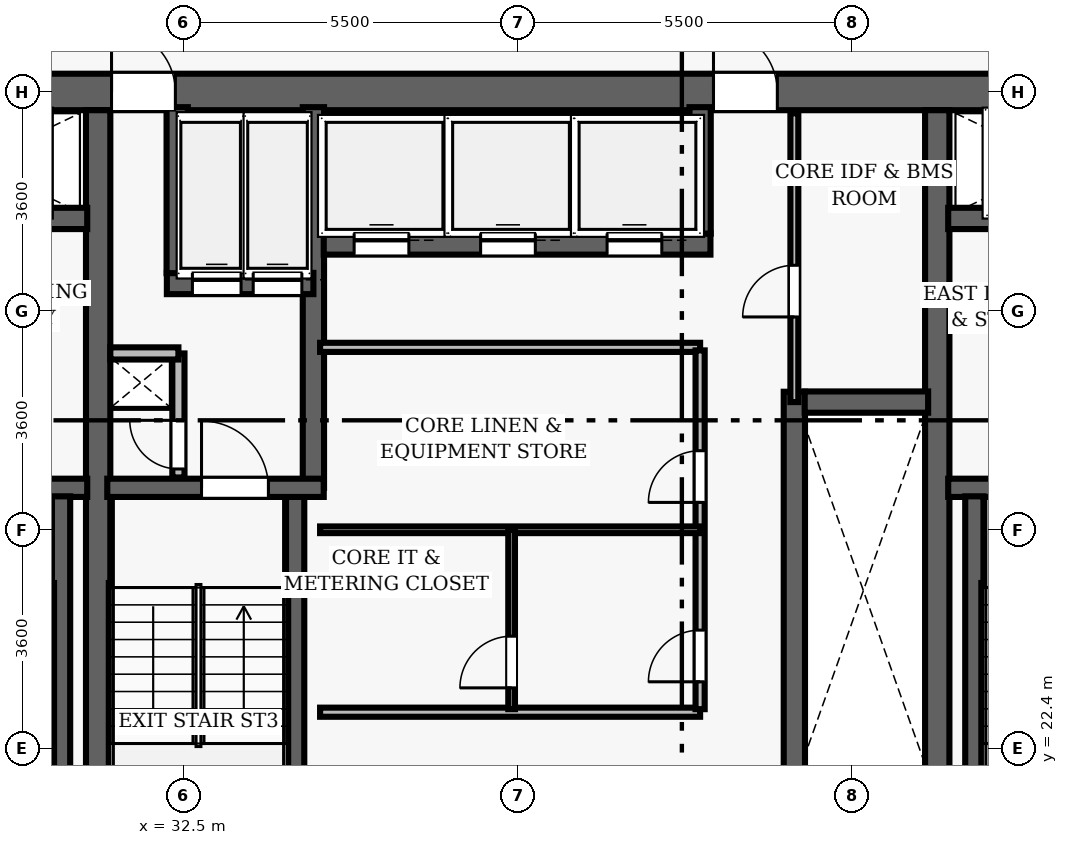
"""IFC4 building model, lengths in metres.
Left out: names, types, materials, properties, quantities, classifications, styles, units other than length and angle.
Written with IfcOpenShell. Run it as: python <this file> out.ifc"""

import sys

from ifc_helpers import new_model, si_unit, direction, frame, frame_2d, origin, place, context, subcontext, project, spatial, rectangle, extrude, element, fill, save


model = new_model("IFC4")
c1 = context("Model", 3, precision=1e-05, world=origin(), true_north=direction((0.0, 1.0)))
c2 = subcontext(c1, "Body", "Model", "MODEL_VIEW")
j1 = project(units=[si_unit("LENGTHUNIT", "METRE"), si_unit("PLANEANGLEUNIT", "RADIAN")], contexts=[c1])
p1 = place(None, origin())
s1 = spatial("IfcSite", under=j1, at=p1, CompositionType="ELEMENT")
p2 = place(p1, origin())
s2 = spatial("IfcBuilding", under=s1, at=p2, CompositionType="ELEMENT")
p3 = place(p2, frame((0.0, 0.0, 102.8)))
s3 = spatial("IfcBuildingStorey", under=s2, at=p3, CompositionType="ELEMENT", Elevation=102.8)
p4 = place(p3, frame((26.7, 33.2, 0.0), z_axis=(0.0, 0.0, 1.0), x_axis=(1.0, 0.0, 0.0)))
e1 = element("IfcWall", 1, at=p4, inside=s3, PredefinedType="SHEAR", context=c2, shape_type="SweptSolid", body=[
    extrude(rectangle(XDim=22.6, YDim=0.6, at=frame_2d((11.3, 0.0))), origin(), (0.0, 0.0, 1.0), 3.5),
])
p5 = place(p4, frame((4.62, 0.0, 0.0)))
e2 = element("IfcOpeningElement", 2, at=p5, cuts=e1, PredefinedType="OPENING", context=c2, shape_type="SweptSolid", body=[
    extrude(rectangle(XDim=1.05, YDim=2.15, at=frame_2d((0.525, 1.075))), frame((0.0, 0.31, 0.0), z_axis=(0.0, -1.0, 0.0), x_axis=(1.0, 0.0, 0.0)), (0.0, 0.0, 1.0), 0.62),
])
p6 = place(p4, frame((14.52, 0.0, 0.0)))
e3 = element("IfcOpeningElement", 3, at=p6, cuts=e1, PredefinedType="OPENING", context=c2, shape_type="SweptSolid", body=[
    extrude(rectangle(XDim=1.05, YDim=2.15, at=frame_2d((0.525, 1.075))), frame((0.0, 0.31, 0.0), z_axis=(0.0, -1.0, 0.0), x_axis=(1.0, 0.0, 0.0)), (0.0, 0.0, 1.0), 0.62),
])
for number, where, z_axis, x_axis in (
    (4, (31.1, 19.1, 0.0), (0.0, 0.0, 1.0), (0.0, 1.0, 0.0)),
    (5, (44.9, 19.1, 0.0), (0.0, 0.0, 1.0), (0.0, 1.0, 0.0)),
):
    element("IfcWall", number, at=place(p3, frame(where, z_axis=z_axis, x_axis=x_axis)), inside=s3, PredefinedType="SHEAR", context=c2, shape_type="SweptSolid", body=[
        extrude(rectangle(XDim=13.8, YDim=0.4, at=frame_2d((6.9, 0.0))), origin(), (0.0, 0.0, 1.0), 3.5),
    ])
p7 = place(p3, frame((27.25, 26.69, 0.0), z_axis=(0.0, 0.0, 1.0), x_axis=(1.0, 0.0, 0.0)))
e6 = element("IfcWall", 6, at=p7, inside=s3, PredefinedType="SHEAR", context=c2, shape_type="SweptSolid", body=[
    extrude(rectangle(XDim=3.67, YDim=0.3, at=frame_2d((1.835, 0.0))), origin(), (0.0, 0.0, 1.0), 3.5),
])
p8 = place(p7, frame((1.05, 0.0, 0.0)))
e7 = element("IfcOpeningElement", 7, at=p8, cuts=e6, PredefinedType="OPENING", context=c2, shape_type="SweptSolid", body=[
    extrude(rectangle(XDim=1.1, YDim=2.15, at=frame_2d((0.55, 1.075))), frame((0.0, 0.16, 0.0), z_axis=(0.0, -1.0, 0.0), x_axis=(1.0, 0.0, 0.0)), (0.0, 0.0, 1.0), 0.32),
])
p9 = place(p3, frame((30.49, 19.05, 0.0), z_axis=(0.0, 0.0, 1.0), x_axis=(0.0, 1.0, 0.0)))
e8 = element("IfcWall", 8, at=p9, inside=s3, PredefinedType="SHEAR", context=c2, shape_type="SweptSolid", body=[
    extrude(rectangle(XDim=7.5, YDim=0.3, at=frame_2d((3.75, 0.0))), origin(), (0.0, 0.0, 1.0), 3.5),
])
p10 = place(p3, frame((27.25, 31.12, 0.0), z_axis=(0.0, 0.0, 1.0), x_axis=(1.0, 0.0, 0.0)))
e9 = element("IfcWall", 9, at=p10, inside=s3, PredefinedType="SHEAR", context=c2, shape_type="SweptSolid", body=[
    extrude(rectangle(XDim=3.67, YDim=0.35, at=frame_2d((1.835, 0.0))), origin(), (0.0, 0.0, 1.0), 2.675),
])
p11 = place(p10, frame((1.25, 0.0, 0.0)))
e10 = element("IfcOpeningElement", 10, at=p11, cuts=e9, PredefinedType="OPENING", context=c2, shape_type="SweptSolid", body=[
    extrude(rectangle(XDim=1.1, YDim=2.15, at=frame_2d((0.55, 1.075))), frame((0.0, 0.185, 0.0), z_axis=(0.0, -1.0, 0.0), x_axis=(1.0, 0.0, 0.0)), (0.0, 0.0, 1.0), 0.37),
])
p12 = place(p3, frame((45.08, 26.69, 0.0), z_axis=(0.0, 0.0, 1.0), x_axis=(1.0, 0.0, 0.0)))
e11 = element("IfcWall", 11, at=p12, inside=s3, PredefinedType="SHEAR", context=c2, shape_type="SweptSolid", body=[
    extrude(rectangle(XDim=3.67, YDim=0.3, at=frame_2d((1.835, 0.0))), origin(), (0.0, 0.0, 1.0), 3.5),
])
p13 = place(p12, frame((1.05, 0.0, 0.0)))
e12 = element("IfcOpeningElement", 12, at=p13, cuts=e11, PredefinedType="OPENING", context=c2, shape_type="SweptSolid", body=[
    extrude(rectangle(XDim=1.1, YDim=2.15, at=frame_2d((0.55, 1.075))), frame((0.0, 0.16, 0.0), z_axis=(0.0, -1.0, 0.0), x_axis=(1.0, 0.0, 0.0)), (0.0, 0.0, 1.0), 0.32),
])
p14 = place(p3, frame((45.51, 19.05, 0.0), z_axis=(0.0, 0.0, 1.0), x_axis=(0.0, 1.0, 0.0)))
e13 = element("IfcWall", 13, at=p14, inside=s3, PredefinedType="SHEAR", context=c2, shape_type="SweptSolid", body=[
    extrude(rectangle(XDim=7.5, YDim=0.3, at=frame_2d((3.75, 0.0))), origin(), (0.0, 0.0, 1.0), 3.5),
])
p15 = place(p3, frame((45.08, 31.12, 0.0), z_axis=(0.0, 0.0, 1.0), x_axis=(1.0, 0.0, 0.0)))
e14 = element("IfcWall", 14, at=p15, inside=s3, PredefinedType="SHEAR", context=c2, shape_type="SweptSolid", body=[
    extrude(rectangle(XDim=3.67, YDim=0.35, at=frame_2d((1.835, 0.0))), origin(), (0.0, 0.0, 1.0), 2.675),
])
p16 = place(p15, frame((1.25, 0.0, 0.0)))
e15 = element("IfcOpeningElement", 15, at=p16, cuts=e14, PredefinedType="OPENING", context=c2, shape_type="SweptSolid", body=[
    extrude(rectangle(XDim=1.1, YDim=2.15, at=frame_2d((0.55, 1.075))), frame((0.0, 0.185, 0.0), z_axis=(0.0, -1.0, 0.0), x_axis=(1.0, 0.0, 0.0)), (0.0, 0.0, 1.0), 0.37),
])
p17 = place(p3, frame((34.34, 19.05, 0.0), z_axis=(0.0, 0.0, 1.0), x_axis=(0.0, 1.0, 0.0)))
e16 = element("IfcWall", 16, at=p17, inside=s3, PredefinedType="SHEAR", context=c2, shape_type="SweptSolid", body=[
    extrude(rectangle(XDim=7.5, YDim=0.3, at=frame_2d((3.75, 0.0))), origin(), (0.0, 0.0, 1.0), 3.5),
])
p18 = place(p3, frame((34.64, 26.69, 0.0), z_axis=(0.0, 0.0, 1.0), x_axis=(0.0, 1.0, 0.0)))
e17 = element("IfcWall", 17, at=p18, inside=s3, PredefinedType="SHEAR", context=c2, shape_type="SweptSolid", body=[
    extrude(rectangle(XDim=6.26, YDim=0.35, at=frame_2d((3.13, 0.0))), origin(), (0.0, 0.0, 1.0), 3.5),
])
p19 = place(p3, frame((31.25, 26.69, 0.0), z_axis=(0.0, 0.0, 1.0), x_axis=(1.0, 0.0, 0.0)))
e18 = element("IfcWall", 18, at=p19, inside=s3, PredefinedType="SHEAR", context=c2, shape_type="SweptSolid", body=[
    extrude(rectangle(XDim=3.56, YDim=0.3, at=frame_2d((1.78, 0.0))), origin(), (0.0, 0.0, 1.0), 3.5),
])
p20 = place(p19, frame((1.55, 0.0, 0.0)))
e19 = element("IfcOpeningElement", 19, at=p20, cuts=e18, PredefinedType="OPENING", context=c2, shape_type="SweptSolid", body=[
    extrude(rectangle(XDim=1.1, YDim=2.15, at=frame_2d((0.55, 1.075))), frame((0.0, 0.16, 0.0), z_axis=(0.0, -1.0, 0.0), x_axis=(1.0, 0.0, 0.0)), (0.0, 0.0, 1.0), 0.32),
])
p21 = place(p3, frame((32.23, 30.05, 0.0), z_axis=(0.0, 0.0, 1.0), x_axis=(1.0, 0.0, 0.0)))
e20 = element("IfcWall", 20, at=p21, inside=s3, PredefinedType="SHEAR", context=c2, shape_type="SweptSolid", body=[
    extrude(rectangle(XDim=2.41, YDim=0.35, at=frame_2d((1.205, 0.0))), origin(), (0.0, 0.0, 1.0), 2.675),
])
p22 = place(p21, frame((0.42, 0.0, 0.0)))
e21 = element("IfcOpeningElement", 21, at=p22, cuts=e20, PredefinedType="OPENING", context=c2, shape_type="SweptSolid", body=[
    extrude(rectangle(XDim=0.8, YDim=2.15, at=frame_2d((0.4, 1.075))), frame((0.0, 0.185, 0.0), z_axis=(0.0, -1.0, 0.0), x_axis=(1.0, 0.0, 0.0)), (0.0, 0.0, 1.0), 0.37),
])
p23 = place(p21, frame((1.42, 0.0, 0.0)))
e22 = element("IfcOpeningElement", 22, at=p23, cuts=e20, PredefinedType="OPENING", context=c2, shape_type="SweptSolid", body=[
    extrude(rectangle(XDim=0.8, YDim=2.15, at=frame_2d((0.4, 1.075))), frame((0.0, 0.185, 0.0), z_axis=(0.0, -1.0, 0.0), x_axis=(1.0, 0.0, 0.0)), (0.0, 0.0, 1.0), 0.37),
])
p24 = place(p3, frame((32.4, 30.22, 0.0), z_axis=(0.0, 0.0, 1.0), x_axis=(0.0, 1.0, 0.0)))
e23 = element("IfcWall", 23, at=p24, inside=s3, PredefinedType="SHEAR", context=c2, shape_type="SweptSolid", body=[
    extrude(rectangle(XDim=2.73, YDim=0.35, at=frame_2d((1.365, 0.0))), origin(), (0.0, 0.0, 1.0), 2.675),
])
p25 = place(p3, frame((32.42, 26.86, 0.0), z_axis=(0.0, 0.0, 1.0), x_axis=(0.0, 1.0, 0.0)))
e24 = element("IfcWall", 24, at=p25, inside=s3, PredefinedType="PARTITIONING", context=c2, shape_type="SweptSolid", body=[
    extrude(rectangle(XDim=2.04, YDim=0.2, at=frame_2d((1.02, 0.0))), origin(), (0.0, 0.0, 1.0), 2.675),
])
p26 = place(p25, frame((0.14, 0.0, 0.0)))
e25 = element("IfcOpeningElement", 25, at=p26, cuts=e24, PredefinedType="OPENING", context=c2, shape_type="SweptSolid", body=[
    extrude(rectangle(XDim=0.8, YDim=2.05, at=frame_2d((0.4, 1.025))), frame((0.0, 0.11, 0.0), z_axis=(0.0, -1.0, 0.0), x_axis=(1.0, 0.0, 0.0)), (0.0, 0.0, 1.0), 0.22),
])
p27 = place(p3, frame((31.3, 28.9, 0.0), z_axis=(0.0, 0.0, 1.0), x_axis=(1.0, 0.0, 0.0)))
e26 = element("IfcWall", 26, at=p27, inside=s3, PredefinedType="PARTITIONING", context=c2, shape_type="SweptSolid", body=[
    extrude(rectangle(XDim=1.12, YDim=0.2, at=frame_2d((0.56, 0.0))), origin(), (0.0, 0.0, 1.0), 2.675),
])
p28 = place(p3, frame((42.55, 21.73, 0.0), z_axis=(0.0, 0.0, 1.0), x_axis=(0.0, 1.0, 0.0)))
e27 = element("IfcWall", 27, at=p28, inside=s3, PredefinedType="SHEAR", context=c2, shape_type="SweptSolid", body=[
    extrude(rectangle(XDim=6.54, YDim=0.35, at=frame_2d((3.27, 0.0))), origin(), (0.0, 0.0, 1.0), 2.675),
])
p29 = place(p3, frame((42.72, 28.1, 0.0), z_axis=(0.0, 0.0, 1.0), x_axis=(1.0, 0.0, 0.0)))
e28 = element("IfcWall", 28, at=p29, inside=s3, PredefinedType="SHEAR", context=c2, shape_type="SweptSolid", body=[
    extrude(rectangle(XDim=2.03, YDim=0.35, at=frame_2d((1.015, 0.0))), origin(), (0.0, 0.0, 1.0), 2.675),
])
p30 = place(p3, frame((34.81, 30.7, 0.0), z_axis=(0.0, 0.0, 1.0), x_axis=(1.0, 0.0, 0.0)))
e29 = element("IfcWall", 29, at=p30, inside=s3, PredefinedType="SHEAR", context=c2, shape_type="SweptSolid", body=[
    extrude(rectangle(XDim=6.36, YDim=0.35, at=frame_2d((3.18, 0.0))), origin(), (0.0, 0.0, 1.0), 2.675),
])
p31 = place(p30, frame((0.5, 0.0, 0.0)))
e30 = element("IfcOpeningElement", 30, at=p31, cuts=e29, PredefinedType="OPENING", context=c2, shape_type="SweptSolid", body=[
    extrude(rectangle(XDim=0.9, YDim=2.15, at=frame_2d((0.45, 1.075))), frame((0.0, 0.185, 0.0), z_axis=(0.0, -1.0, 0.0), x_axis=(1.0, 0.0, 0.0)), (0.0, 0.0, 1.0), 0.37),
])
p32 = place(p30, frame((2.58, 0.0, 0.0)))
e31 = element("IfcOpeningElement", 31, at=p32, cuts=e29, PredefinedType="OPENING", context=c2, shape_type="SweptSolid", body=[
    extrude(rectangle(XDim=0.9, YDim=2.15, at=frame_2d((0.45, 1.075))), frame((0.0, 0.185, 0.0), z_axis=(0.0, -1.0, 0.0), x_axis=(1.0, 0.0, 0.0)), (0.0, 0.0, 1.0), 0.37),
])
p33 = place(p30, frame((4.66, 0.0, 0.0)))
e32 = element("IfcOpeningElement", 32, at=p33, cuts=e29, PredefinedType="OPENING", context=c2, shape_type="SweptSolid", body=[
    extrude(rectangle(XDim=0.9, YDim=2.15, at=frame_2d((0.45, 1.075))), frame((0.0, 0.185, 0.0), z_axis=(0.0, -1.0, 0.0), x_axis=(1.0, 0.0, 0.0)), (0.0, 0.0, 1.0), 0.37),
])
p34 = place(p3, frame((41.0, 30.87, 0.0), z_axis=(0.0, 0.0, 1.0), x_axis=(0.0, 1.0, 0.0)))
e33 = element("IfcWall", 33, at=p34, inside=s3, PredefinedType="SHEAR", context=c2, shape_type="SweptSolid", body=[
    extrude(rectangle(XDim=2.08, YDim=0.35, at=frame_2d((1.04, 0.0))), origin(), (0.0, 0.0, 1.0), 2.675),
])
for number, where, z_axis, x_axis in (
    (34, (34.75, 29.0, 0.0), (0.0, 0.0, 1.0), (1.0, 0.0, 0.0)),
    (35, (34.75, 23.0, 0.0), (0.0, 0.0, 1.0), (1.0, 0.0, 0.0)),
):
    element("IfcWall", number, at=place(p3, frame(where, z_axis=z_axis, x_axis=x_axis)), inside=s3, PredefinedType="PARTITIONING", context=c2, shape_type="SweptSolid", body=[
        extrude(rectangle(XDim=6.25, YDim=0.15, at=frame_2d((3.125, 0.0))), origin(), (0.0, 0.0, 1.0), 2.675),
    ])
p35 = place(p3, frame((41.0, 23.05, 0.0), z_axis=(0.0, 0.0, 1.0), x_axis=(0.0, 1.0, 0.0)))
e36 = element("IfcWall", 36, at=p35, inside=s3, PredefinedType="PARTITIONING", context=c2, shape_type="SweptSolid", body=[
    extrude(rectangle(XDim=5.9, YDim=0.15, at=frame_2d((2.95, 0.0))), origin(), (0.0, 0.0, 1.0), 2.675),
])
p36 = place(p35, frame((3.4, 0.0, 0.0)))
e37 = element("IfcOpeningElement", 37, at=p36, cuts=e36, PredefinedType="OPENING", context=c2, shape_type="SweptSolid", body=[
    extrude(rectangle(XDim=0.85, YDim=2.1, at=frame_2d((0.425, 1.05))), frame((0.0, 0.085, 0.0), z_axis=(0.0, -1.0, 0.0), x_axis=(1.0, 0.0, 0.0)), (0.0, 0.0, 1.0), 0.17),
])
p37 = place(p35, frame((0.45, 0.0, 0.0)))
e38 = element("IfcOpeningElement", 38, at=p37, cuts=e36, PredefinedType="OPENING", context=c2, shape_type="SweptSolid", body=[
    extrude(rectangle(XDim=0.85, YDim=2.1, at=frame_2d((0.425, 1.05))), frame((0.0, 0.085, 0.0), z_axis=(0.0, -1.0, 0.0), x_axis=(1.0, 0.0, 0.0)), (0.0, 0.0, 1.0), 0.17),
])
p38 = place(p3, frame((34.75, 26.0, 0.0), z_axis=(0.0, 0.0, 1.0), x_axis=(1.0, 0.0, 0.0)))
e39 = element("IfcWall", 39, at=p38, inside=s3, PredefinedType="PARTITIONING", context=c2, shape_type="SweptSolid", body=[
    extrude(rectangle(XDim=6.25, YDim=0.11, at=frame_2d((3.125, 0.0))), origin(), (0.0, 0.0, 1.0), 2.675),
])
p39 = place(p3, frame((37.9, 23.05, 0.0), z_axis=(0.0, 0.0, 1.0), x_axis=(0.0, 1.0, 0.0)))
e40 = element("IfcWall", 40, at=p39, inside=s3, PredefinedType="PARTITIONING", context=c2, shape_type="SweptSolid", body=[
    extrude(rectangle(XDim=2.95, YDim=0.11, at=frame_2d((1.475, 0.0))), origin(), (0.0, 0.0, 1.0), 2.675),
])
p40 = place(p39, frame((0.35, 0.0, 0.0)))
e41 = element("IfcOpeningElement", 41, at=p40, cuts=e40, PredefinedType="OPENING", context=c2, shape_type="SweptSolid", body=[
    extrude(rectangle(XDim=0.85, YDim=2.1, at=frame_2d((0.425, 1.05))), frame((0.0, 0.065, 0.0), z_axis=(0.0, -1.0, 0.0), x_axis=(1.0, 0.0, 0.0)), (0.0, 0.0, 1.0), 0.13),
])
p41 = place(p3, frame((42.55, 28.1, 0.0), z_axis=(0.0, 0.0, 1.0), x_axis=(0.0, 1.0, 0.0)))
e42 = element("IfcWall", 42, at=p41, inside=s3, PredefinedType="PARTITIONING", context=c2, shape_type="SweptSolid", body=[
    extrude(rectangle(XDim=4.75, YDim=0.13, at=frame_2d((2.375, 0.0))), origin(), (0.0, 0.0, 1.0), 2.675),
])
p42 = place(p41, frame((1.4, 0.0, 0.0)))
e43 = element("IfcOpeningElement", 43, at=p42, cuts=e42, PredefinedType="OPENING", context=c2, shape_type="SweptSolid", body=[
    extrude(rectangle(XDim=0.85, YDim=2.1, at=frame_2d((0.425, 1.05))), frame((0.0, 0.075, 0.0), z_axis=(0.0, -1.0, 0.0), x_axis=(1.0, 0.0, 0.0)), (0.0, 0.0, 1.0), 0.15),
])
p43 = place(p20, origin())
e44 = element("IfcDoor", 44, at=p43, inside=s3, OperationType="SINGLE_SWING_LEFT", PredefinedType="DOOR", context=c2, shape_type="SweptSolid", body=[
    extrude(rectangle(XDim=1.1, YDim=2.15, at=frame_2d((0.55, 1.075))), frame((0.0, 0.025, 0.0), z_axis=(0.0, -1.0, 0.0), x_axis=(1.0, 0.0, 0.0)), (0.0, 0.0, 1.0), 0.05),
])
fill(e19, e44)
p44 = place(p26, origin())
e45 = element("IfcDoor", 45, at=p44, inside=s3, OperationType="SINGLE_SWING_RIGHT", PredefinedType="DOOR", context=c2, shape_type="SweptSolid", body=[
    extrude(rectangle(XDim=0.8, YDim=2.05, at=frame_2d((0.4, 1.025))), frame((0.0, 0.025, 0.0), z_axis=(0.0, -1.0, 0.0), x_axis=(1.0, 0.0, 0.0)), (0.0, 0.0, 1.0), 0.05),
])
fill(e25, e45)
p45 = place(p5, origin())
e46 = element("IfcDoor", 46, at=p45, inside=s3, OperationType="SINGLE_SWING_LEFT", PredefinedType="DOOR", context=c2, shape_type="SweptSolid", body=[
    extrude(rectangle(XDim=1.05, YDim=2.15, at=frame_2d((0.525, 1.075))), frame((0.0, 0.025, 0.0), z_axis=(0.0, -1.0, 0.0), x_axis=(1.0, 0.0, 0.0)), (0.0, 0.0, 1.0), 0.05),
])
fill(e2, e46)
p46 = place(p6, origin())
e47 = element("IfcDoor", 47, at=p46, inside=s3, OperationType="SINGLE_SWING_LEFT", PredefinedType="DOOR", context=c2, shape_type="SweptSolid", body=[
    extrude(rectangle(XDim=1.05, YDim=2.15, at=frame_2d((0.525, 1.075))), frame((0.0, 0.025, 0.0), z_axis=(0.0, -1.0, 0.0), x_axis=(1.0, 0.0, 0.0)), (0.0, 0.0, 1.0), 0.05),
])
fill(e3, e47)
p47 = place(p36, origin())
e48 = element("IfcDoor", 48, at=p47, inside=s3, OperationType="SINGLE_SWING_LEFT", PredefinedType="DOOR", context=c2, shape_type="SweptSolid", body=[
    extrude(rectangle(XDim=0.85, YDim=2.1, at=frame_2d((0.425, 1.05))), frame((0.0, 0.025, 0.0), z_axis=(0.0, -1.0, 0.0), x_axis=(1.0, 0.0, 0.0)), (0.0, 0.0, 1.0), 0.05),
])
fill(e37, e48)
p48 = place(p37, origin())
e49 = element("IfcDoor", 49, at=p48, inside=s3, OperationType="SINGLE_SWING_LEFT", PredefinedType="DOOR", context=c2, shape_type="SweptSolid", body=[
    extrude(rectangle(XDim=0.85, YDim=2.1, at=frame_2d((0.425, 1.05))), frame((0.0, 0.025, 0.0), z_axis=(0.0, -1.0, 0.0), x_axis=(1.0, 0.0, 0.0)), (0.0, 0.0, 1.0), 0.05),
])
fill(e38, e49)
p49 = place(p40, origin())
e50 = element("IfcDoor", 50, at=p49, inside=s3, OperationType="SINGLE_SWING_LEFT", PredefinedType="DOOR", context=c2, shape_type="SweptSolid", body=[
    extrude(rectangle(XDim=0.85, YDim=2.1, at=frame_2d((0.425, 1.05))), frame((0.0, 0.025, 0.0), z_axis=(0.0, -1.0, 0.0), x_axis=(1.0, 0.0, 0.0)), (0.0, 0.0, 1.0), 0.05),
])
fill(e41, e50)
p50 = place(p42, origin())
e51 = element("IfcDoor", 51, at=p50, inside=s3, OperationType="SINGLE_SWING_LEFT", PredefinedType="DOOR", context=c2, shape_type="SweptSolid", body=[
    extrude(rectangle(XDim=0.85, YDim=2.1, at=frame_2d((0.425, 1.05))), frame((0.0, 0.025, 0.0), z_axis=(0.0, -1.0, 0.0), x_axis=(1.0, 0.0, 0.0)), (0.0, 0.0, 1.0), 0.05),
])
fill(e43, e51)
p51 = place(p31, origin())
e52 = element("IfcDoor", 52, at=p51, inside=s3, OperationType="SLIDING_TO_LEFT", PredefinedType="DOOR", context=c2, shape_type="SweptSolid", body=[
    extrude(rectangle(XDim=0.9, YDim=2.15, at=frame_2d((0.45, 1.075))), frame((0.0, 0.025, 0.0), z_axis=(0.0, -1.0, 0.0), x_axis=(1.0, 0.0, 0.0)), (0.0, 0.0, 1.0), 0.05),
])
fill(e30, e52)
p52 = place(p32, origin())
e53 = element("IfcDoor", 53, at=p52, inside=s3, OperationType="SLIDING_TO_LEFT", PredefinedType="DOOR", context=c2, shape_type="SweptSolid", body=[
    extrude(rectangle(XDim=0.9, YDim=2.15, at=frame_2d((0.45, 1.075))), frame((0.0, 0.025, 0.0), z_axis=(0.0, -1.0, 0.0), x_axis=(1.0, 0.0, 0.0)), (0.0, 0.0, 1.0), 0.05),
])
fill(e31, e53)
p53 = place(p33, origin())
e54 = element("IfcDoor", 54, at=p53, inside=s3, OperationType="SLIDING_TO_LEFT", PredefinedType="DOOR", context=c2, shape_type="SweptSolid", body=[
    extrude(rectangle(XDim=0.9, YDim=2.15, at=frame_2d((0.45, 1.075))), frame((0.0, 0.025, 0.0), z_axis=(0.0, -1.0, 0.0), x_axis=(1.0, 0.0, 0.0)), (0.0, 0.0, 1.0), 0.05),
])
fill(e32, e54)
p54 = place(p22, origin())
e55 = element("IfcDoor", 55, at=p54, inside=s3, OperationType="SLIDING_TO_LEFT", PredefinedType="DOOR", context=c2, shape_type="SweptSolid", body=[
    extrude(rectangle(XDim=0.8, YDim=2.15, at=frame_2d((0.4, 1.075))), frame((0.0, 0.025, 0.0), z_axis=(0.0, -1.0, 0.0), x_axis=(1.0, 0.0, 0.0)), (0.0, 0.0, 1.0), 0.05),
])
fill(e21, e55)
p55 = place(p23, origin())
e56 = element("IfcDoor", 56, at=p55, inside=s3, OperationType="SLIDING_TO_LEFT", PredefinedType="DOOR", context=c2, shape_type="SweptSolid", body=[
    extrude(rectangle(XDim=0.8, YDim=2.15, at=frame_2d((0.4, 1.075))), frame((0.0, 0.025, 0.0), z_axis=(0.0, -1.0, 0.0), x_axis=(1.0, 0.0, 0.0)), (0.0, 0.0, 1.0), 0.05),
])
fill(e22, e56)
save(model, sys.argv[1])
